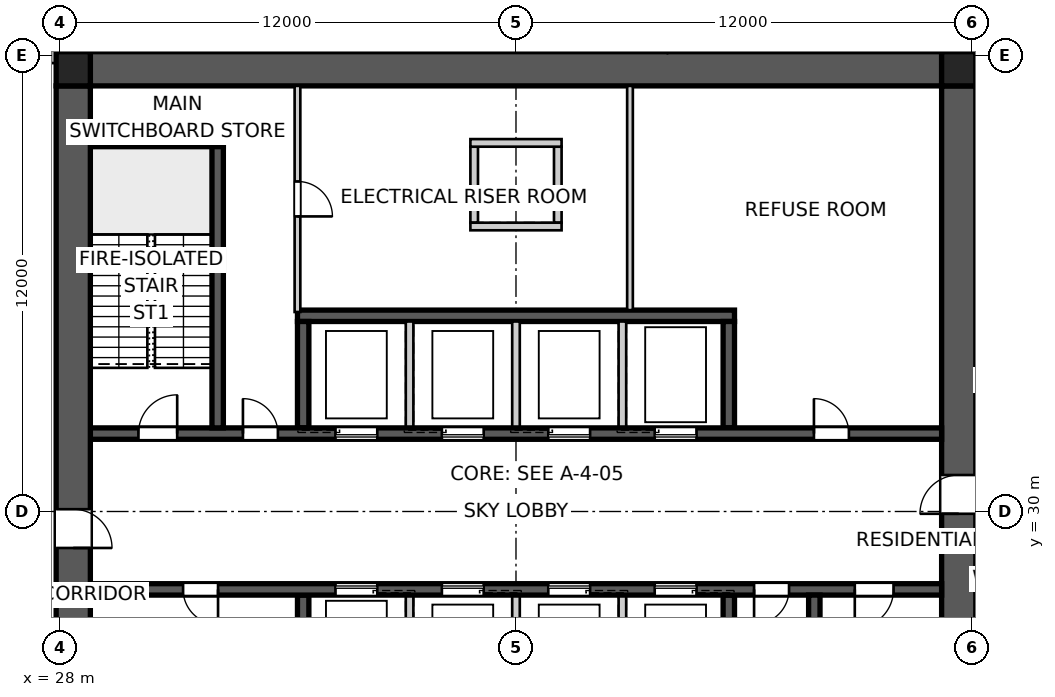
"""IFC4 building model, lengths in metres.
Left out: names, types, materials, properties, quantities, classifications, styles, units other than length and angle.
Written with IfcOpenShell. Run it as: python <this file> out.ifc"""

import sys

from ifc_helpers import new_model, si_unit, direction, frame, frame_2d, origin, origin_2d, place, context, subcontext, project, spatial, polyline, rectangle, outline, extrude, element, fill, save


model = new_model("IFC4")
c1 = context("Model", 3, precision=1e-05, world=origin(), true_north=direction((0.0, 1.0)))
c2 = subcontext(c1, "Body", "Model", "MODEL_VIEW")
j1 = project(units=[si_unit("LENGTHUNIT", "METRE"), si_unit("PLANEANGLEUNIT", "RADIAN")], contexts=[c1])
p1 = place(None, origin())
s1 = spatial("IfcSite", under=j1, at=p1, CompositionType="ELEMENT")
p2 = place(p1, origin())
s2 = spatial("IfcBuilding", under=s1, at=p2, CompositionType="ELEMENT")
p3 = place(p2, frame((0.0, 0.0, 138.8)))
s3 = spatial("IfcBuildingStorey", under=s2, at=p3, CompositionType="ELEMENT", Elevation=138.8)
p4 = place(p3, frame((28.8, 41.65, 0.0), z_axis=(0.0, 0.0, 1.0), x_axis=(1.0, 0.0, 0.0)))
e1 = element("IfcWall", 1, at=p4, inside=s3, PredefinedType="SHEAR", context=c2, shape_type="SweptSolid", body=[
    extrude(outline(polyline([(0.0, -0.45), (22.4, -0.45), (22.4, -0.025), (22.85, -0.025), (22.85, 0.025), (22.4, 0.025), (22.4, 0.45), (0.0, 0.45), (0.0, 0.025), (-0.45, 0.025), (-0.45, -0.025), (0.0, -0.025), (0.0, -0.45)])), origin(), (0.0, 0.0, 1.0), 5.0),
])
p5 = place(p3, frame((51.65, 18.8, 0.0), z_axis=(0.0, 0.0, 1.0), x_axis=(0.0, 1.0, 0.0)))
e2 = element("IfcWall", 2, at=p5, inside=s3, PredefinedType="SHEAR", context=c2, shape_type="SweptSolid", body=[
    extrude(outline(polyline([(0.0, -0.45), (22.4, -0.45), (22.4, -0.025), (22.85, -0.025), (22.85, 0.025), (22.4, 0.025), (22.4, 0.45), (0.0, 0.45), (0.0, 0.025), (-0.45, 0.025), (-0.45, -0.025), (0.0, -0.025), (0.0, -0.45)])), origin(), (0.0, 0.0, 1.0), 5.0),
])
p6 = place(p5, frame((11.14, 0.0, 0.0)))
e3 = element("IfcOpeningElement", 3, at=p6, cuts=e2, PredefinedType="OPENING", context=c2, shape_type="SweptSolid", body=[
    extrude(rectangle(XDim=1.02, YDim=2.4, at=frame_2d((0.51, 1.2))), frame((0.0, 0.46, 0.0), z_axis=(0.0, -1.0, 0.0), x_axis=(1.0, 0.0, 0.0)), (0.0, 0.0, 1.0), 0.92),
])
p7 = place(p3, frame((28.35, 41.2, 0.0), z_axis=(0.0, 0.0, 1.0), x_axis=(0.0, -1.0, 0.0)))
e4 = element("IfcWall", 4, at=p7, inside=s3, PredefinedType="SHEAR", context=c2, shape_type="SweptSolid", body=[
    extrude(outline(polyline([(0.0, -0.45), (22.4, -0.45), (22.4, -0.025), (22.85, -0.025), (22.85, 0.025), (22.4, 0.025), (22.4, 0.45), (0.0, 0.45), (0.0, 0.025), (-0.45, 0.025), (-0.45, -0.025), (0.0, -0.025), (0.0, -0.45)])), origin(), (0.0, 0.0, 1.0), 5.0),
])
p8 = place(p7, frame((11.14, 0.0, 0.0)))
e5 = element("IfcOpeningElement", 5, at=p8, cuts=e4, PredefinedType="OPENING", context=c2, shape_type="SweptSolid", body=[
    extrude(rectangle(XDim=1.02, YDim=2.4, at=frame_2d((0.51, 1.2))), frame((0.0, 0.46, 0.0), z_axis=(0.0, -1.0, 0.0), x_axis=(1.0, 0.0, 0.0)), (0.0, 0.0, 1.0), 0.92),
])
p9 = place(p3, frame((28.8, 32.05, 0.0), z_axis=(0.0, 0.0, 1.0), x_axis=(1.0, 0.0, 0.0)))
e6 = element("IfcWall", 6, at=p9, inside=s3, PredefinedType="SHEAR", context=c2, shape_type="SweptSolid", body=[
    extrude(rectangle(XDim=22.4, YDim=0.3, at=frame_2d((11.2, 0.0))), origin(), (0.0, 0.0, 1.0), 5.0),
])
p10 = place(p9, frame((19.04, 0.0, 0.0)))
e7 = element("IfcOpeningElement", 7, at=p10, cuts=e6, PredefinedType="OPENING", context=c2, shape_type="SweptSolid", body=[
    extrude(rectangle(XDim=0.92, YDim=2.1, at=frame_2d((0.46, 1.05))), frame((0.0, 0.16, 0.0), z_axis=(0.0, -1.0, 0.0), x_axis=(1.0, 0.0, 0.0)), (0.0, 0.0, 1.0), 0.32),
])
p11 = place(p9, frame((1.265, 0.0, 0.0)))
e8 = element("IfcOpeningElement", 8, at=p11, cuts=e6, PredefinedType="OPENING", context=c2, shape_type="SweptSolid", body=[
    extrude(rectangle(XDim=1.02, YDim=2.1, at=frame_2d((0.51, 1.05))), frame((0.0, 0.16, 0.0), z_axis=(0.0, -1.0, 0.0), x_axis=(1.0, 0.0, 0.0)), (0.0, 0.0, 1.0), 0.32),
])
p12 = place(p9, frame((4.015, 0.0, 0.0)))
e9 = element("IfcOpeningElement", 9, at=p12, cuts=e6, PredefinedType="OPENING", context=c2, shape_type="SweptSolid", body=[
    extrude(rectangle(XDim=0.92, YDim=2.1, at=frame_2d((0.46, 1.05))), frame((0.0, 0.16, 0.0), z_axis=(0.0, -1.0, 0.0), x_axis=(1.0, 0.0, 0.0)), (0.0, 0.0, 1.0), 0.32),
])
p13 = place(p9, frame((6.45, 0.0, 0.0)))
e10 = element("IfcOpeningElement", 10, at=p13, cuts=e6, PredefinedType="OPENING", context=c2, shape_type="SweptSolid", body=[
    extrude(rectangle(XDim=1.1, YDim=2.1, at=frame_2d((0.55, 1.05))), frame((0.0, 0.16, 0.0), z_axis=(0.0, -1.0, 0.0), x_axis=(1.0, 0.0, 0.0)), (0.0, 0.0, 1.0), 0.32),
])
p14 = place(p9, frame((9.25, 0.0, 0.0)))
e11 = element("IfcOpeningElement", 11, at=p14, cuts=e6, PredefinedType="OPENING", context=c2, shape_type="SweptSolid", body=[
    extrude(rectangle(XDim=1.1, YDim=2.1, at=frame_2d((0.55, 1.05))), frame((0.0, 0.16, 0.0), z_axis=(0.0, -1.0, 0.0), x_axis=(1.0, 0.0, 0.0)), (0.0, 0.0, 1.0), 0.32),
])
p15 = place(p9, frame((12.05, 0.0, 0.0)))
e12 = element("IfcOpeningElement", 12, at=p15, cuts=e6, PredefinedType="OPENING", context=c2, shape_type="SweptSolid", body=[
    extrude(rectangle(XDim=1.1, YDim=2.1, at=frame_2d((0.55, 1.05))), frame((0.0, 0.16, 0.0), z_axis=(0.0, -1.0, 0.0), x_axis=(1.0, 0.0, 0.0)), (0.0, 0.0, 1.0), 0.32),
])
p16 = place(p9, frame((14.85, 0.0, 0.0)))
e13 = element("IfcOpeningElement", 13, at=p16, cuts=e6, PredefinedType="OPENING", context=c2, shape_type="SweptSolid", body=[
    extrude(rectangle(XDim=1.1, YDim=2.1, at=frame_2d((0.55, 1.05))), frame((0.0, 0.16, 0.0), z_axis=(0.0, -1.0, 0.0), x_axis=(1.0, 0.0, 0.0)), (0.0, 0.0, 1.0), 0.32),
])
p17 = place(p3, frame((51.2, 27.95, 0.0), z_axis=(0.0, 0.0, 1.0), x_axis=(-1.0, 0.0, 0.0)))
e14 = element("IfcWall", 14, at=p17, inside=s3, PredefinedType="SHEAR", context=c2, shape_type="SweptSolid", body=[
    extrude(rectangle(XDim=22.4, YDim=0.3, at=frame_2d((11.2, 0.0))), origin(), (0.0, 0.0, 1.0), 5.0),
])
p18 = place(p17, frame((19.04, 0.0, 0.0)))
e15 = element("IfcOpeningElement", 15, at=p18, cuts=e14, PredefinedType="OPENING", context=c2, shape_type="SweptSolid", body=[
    extrude(rectangle(XDim=0.92, YDim=2.1, at=frame_2d((0.46, 1.05))), frame((0.0, 0.16, 0.0), z_axis=(0.0, -1.0, 0.0), x_axis=(1.0, 0.0, 0.0)), (0.0, 0.0, 1.0), 0.32),
])
p19 = place(p17, frame((1.265, 0.0, 0.0)))
e16 = element("IfcOpeningElement", 16, at=p19, cuts=e14, PredefinedType="OPENING", context=c2, shape_type="SweptSolid", body=[
    extrude(rectangle(XDim=1.02, YDim=2.1, at=frame_2d((0.51, 1.05))), frame((0.0, 0.16, 0.0), z_axis=(0.0, -1.0, 0.0), x_axis=(1.0, 0.0, 0.0)), (0.0, 0.0, 1.0), 0.32),
])
p20 = place(p17, frame((4.015, 0.0, 0.0)))
e17 = element("IfcOpeningElement", 17, at=p20, cuts=e14, PredefinedType="OPENING", context=c2, shape_type="SweptSolid", body=[
    extrude(rectangle(XDim=0.92, YDim=2.1, at=frame_2d((0.46, 1.05))), frame((0.0, 0.16, 0.0), z_axis=(0.0, -1.0, 0.0), x_axis=(1.0, 0.0, 0.0)), (0.0, 0.0, 1.0), 0.32),
])
p21 = place(p17, frame((6.45, 0.0, 0.0)))
e18 = element("IfcOpeningElement", 18, at=p21, cuts=e14, PredefinedType="OPENING", context=c2, shape_type="SweptSolid", body=[
    extrude(rectangle(XDim=1.1, YDim=2.1, at=frame_2d((0.55, 1.05))), frame((0.0, 0.16, 0.0), z_axis=(0.0, -1.0, 0.0), x_axis=(1.0, 0.0, 0.0)), (0.0, 0.0, 1.0), 0.32),
])
p22 = place(p17, frame((9.25, 0.0, 0.0)))
e19 = element("IfcOpeningElement", 19, at=p22, cuts=e14, PredefinedType="OPENING", context=c2, shape_type="SweptSolid", body=[
    extrude(rectangle(XDim=1.1, YDim=2.1, at=frame_2d((0.55, 1.05))), frame((0.0, 0.16, 0.0), z_axis=(0.0, -1.0, 0.0), x_axis=(1.0, 0.0, 0.0)), (0.0, 0.0, 1.0), 0.32),
])
p23 = place(p17, frame((12.05, 0.0, 0.0)))
e20 = element("IfcOpeningElement", 20, at=p23, cuts=e14, PredefinedType="OPENING", context=c2, shape_type="SweptSolid", body=[
    extrude(rectangle(XDim=1.1, YDim=2.1, at=frame_2d((0.55, 1.05))), frame((0.0, 0.16, 0.0), z_axis=(0.0, -1.0, 0.0), x_axis=(1.0, 0.0, 0.0)), (0.0, 0.0, 1.0), 0.32),
])
p24 = place(p17, frame((14.85, 0.0, 0.0)))
e21 = element("IfcOpeningElement", 21, at=p24, cuts=e14, PredefinedType="OPENING", context=c2, shape_type="SweptSolid", body=[
    extrude(rectangle(XDim=1.1, YDim=2.1, at=frame_2d((0.55, 1.05))), frame((0.0, 0.16, 0.0), z_axis=(0.0, -1.0, 0.0), x_axis=(1.0, 0.0, 0.0)), (0.0, 0.0, 1.0), 0.32),
])
p25 = place(p3, frame((34.25, 35.15, 0.0), z_axis=(0.0, 0.0, 1.0), x_axis=(1.0, 0.0, 0.0)))
e22 = element("IfcWall", 22, at=p25, inside=s3, PredefinedType="SHEAR", context=c2, shape_type="SweptSolid", body=[
    extrude(rectangle(XDim=11.5, YDim=0.3, at=frame_2d((5.75, 0.0))), origin(), (0.0, 0.0, 1.0), 5.0),
])
for number, where, z_axis, x_axis in (
    (23, (34.4, 32.2, 0.0), (0.0, 0.0, 1.0), (0.0, 1.0, 0.0)),
    (24, (45.6, 27.8, 0.0), (0.0, 0.0, 1.0), (0.0, -1.0, 0.0)),
):
    element("IfcWall", number, at=place(p3, frame(where, z_axis=z_axis, x_axis=x_axis)), inside=s3, PredefinedType="SHEAR", context=c2, shape_type="SweptSolid", body=[
        extrude(rectangle(XDim=2.8, YDim=0.3, at=frame_2d((1.4, 0.0))), origin(), (0.0, 0.0, 1.0), 5.0),
    ])
for number, where, z_axis, x_axis in (
    (25, (37.2, 32.2, 0.0), (0.0, 0.0, 1.0), (0.0, 1.0, 0.0)),
    (26, (42.8, 27.8, 0.0), (0.0, 0.0, 1.0), (0.0, -1.0, 0.0)),
    (27, (40.0, 32.2, 0.0), (0.0, 0.0, 1.0), (0.0, 1.0, 0.0)),
    (28, (40.0, 27.8, 0.0), (0.0, 0.0, 1.0), (0.0, -1.0, 0.0)),
    (29, (42.8, 32.2, 0.0), (0.0, 0.0, 1.0), (0.0, 1.0, 0.0)),
    (30, (37.2, 27.8, 0.0), (0.0, 0.0, 1.0), (0.0, -1.0, 0.0)),
):
    element("IfcWall", number, at=place(p3, frame(where, z_axis=z_axis, x_axis=x_axis)), inside=s3, PredefinedType="SOLIDWALL", context=c2, shape_type="SweptSolid", body=[
        extrude(rectangle(XDim=2.8, YDim=0.2, at=frame_2d((1.4, 0.0))), origin(), (0.0, 0.0, 1.0), 5.0),
    ])
for number, where, z_axis, x_axis in (
    (31, (45.6, 32.2, 0.0), (0.0, 0.0, 1.0), (0.0, 1.0, 0.0)),
    (32, (34.4, 27.8, 0.0), (0.0, 0.0, 1.0), (0.0, -1.0, 0.0)),
):
    element("IfcWall", number, at=place(p3, frame(where, z_axis=z_axis, x_axis=x_axis)), inside=s3, PredefinedType="SHEAR", context=c2, shape_type="SweptSolid", body=[
        extrude(rectangle(XDim=2.8, YDim=0.3, at=frame_2d((1.4, 0.0))), origin(), (0.0, 0.0, 1.0), 5.0),
    ])
p26 = place(p3, frame((32.15, 32.2, 0.0), z_axis=(0.0, 0.0, 1.0), x_axis=(0.0, 1.0, 0.0)))
e33 = element("IfcWall", 33, at=p26, inside=s3, PredefinedType="SHEAR", context=c2, shape_type="SweptSolid", body=[
    extrude(rectangle(XDim=7.7, YDim=0.3, at=frame_2d((3.85, 0.0))), origin(), (0.0, 0.0, 1.0), 5.0),
])
p27 = place(p3, frame((28.8, 39.75, 0.0), z_axis=(0.0, 0.0, 1.0), x_axis=(1.0, 0.0, 0.0)))
e34 = element("IfcWall", 34, at=p27, inside=s3, PredefinedType="SHEAR", context=c2, shape_type="SweptSolid", body=[
    extrude(rectangle(XDim=3.5, YDim=0.3, at=frame_2d((1.75, 0.0))), origin(), (0.0, 0.0, 1.0), 5.0),
])
p28 = place(p3, frame((47.85, 27.8, 0.0), z_axis=(0.0, 0.0, 1.0), x_axis=(0.0, -1.0, 0.0)))
e35 = element("IfcWall", 35, at=p28, inside=s3, PredefinedType="SHEAR", context=c2, shape_type="SweptSolid", body=[
    extrude(rectangle(XDim=7.7, YDim=0.3, at=frame_2d((3.85, 0.0))), origin(), (0.0, 0.0, 1.0), 5.0),
])
for number, where, z_axis, x_axis in (
    (36, (38.9, 37.6, 0.0), (0.0, 0.0, 1.0), (0.0, 1.0, 0.0)),
    (37, (41.1, 37.6, 0.0), (0.0, 0.0, 1.0), (0.0, 1.0, 0.0)),
):
    element("IfcWall", number, at=place(p3, frame(where, z_axis=z_axis, x_axis=x_axis)), inside=s3, PredefinedType="SOLIDWALL", context=c2, shape_type="SweptSolid", body=[
        extrude(rectangle(XDim=2.0, YDim=0.2, at=frame_2d((1.0, 0.0))), origin(), (0.0, 0.0, 1.0), 5.0),
    ])
for number, where, z_axis, x_axis in (
    (38, (38.8, 37.5, 0.0), (0.0, 0.0, 1.0), (1.0, 0.0, 0.0)),
    (39, (38.8, 39.7, 0.0), (0.0, 0.0, 1.0), (1.0, 0.0, 0.0)),
):
    element("IfcWall", number, at=place(p3, frame(where, z_axis=z_axis, x_axis=x_axis)), inside=s3, PredefinedType="SOLIDWALL", context=c2, shape_type="SweptSolid", body=[
        extrude(rectangle(XDim=2.4, YDim=0.2, at=frame_2d((1.2, 0.0))), origin(), (0.0, 0.0, 1.0), 5.0),
    ])
for number, where, z_axis, x_axis in (
    (40, (51.65, 41.65, 0.0), (0.0, 0.0, 1.0), (1.0, 0.0, 0.0)),
    (41, (28.35, 41.65, 0.0), (0.0, 0.0, 1.0), (1.0, 0.0, 0.0)),
):
    element("IfcColumn", number, at=place(p3, frame(where, z_axis=z_axis, x_axis=x_axis)), inside=s3, PredefinedType="COLUMN", context=c2, shape_type="SweptSolid", body=[
        extrude(rectangle(XDim=0.9, YDim=0.9, at=origin_2d()), origin(), (0.0, 0.0, 1.0), 5.0),
    ])
p29 = place(p3, frame((52.14, 41.8, 0.0), z_axis=(0.0, 0.0, 1.0), x_axis=(0.0, 1.0, 0.0)))
e42 = element("IfcWall", 42, at=p29, inside=s3, PredefinedType="PARTITIONING", context=c2, shape_type="SweptSolid", body=[
    extrude(rectangle(XDim=1.9, YDim=0.2, at=frame_2d((0.95, 0.0))), origin(), (0.0, 0.0, 1.0), 4.85),
])
p30 = place(p29, frame((0.51, 0.0, 0.0)))
e43 = element("IfcOpeningElement", 43, at=p30, cuts=e42, PredefinedType="OPENING", context=c2, shape_type="SweptSolid", body=[
    extrude(rectangle(XDim=1.02, YDim=2.34, at=frame_2d((0.51, 1.17))), frame((0.0, 0.11, 0.0), z_axis=(0.0, -1.0, 0.0), x_axis=(1.0, 0.0, 0.0)), (0.0, 0.0, 1.0), 0.22),
])
p31 = place(p3, frame((27.86, 41.8, 0.0), z_axis=(0.0, 0.0, 1.0), x_axis=(0.0, 1.0, 0.0)))
e44 = element("IfcWall", 44, at=p31, inside=s3, PredefinedType="PARTITIONING", context=c2, shape_type="SweptSolid", body=[
    extrude(rectangle(XDim=1.9, YDim=0.2, at=frame_2d((0.95, 0.0))), origin(), (0.0, 0.0, 1.0), 4.85),
])
p32 = place(p31, frame((0.51, 0.0, 0.0)))
e45 = element("IfcOpeningElement", 45, at=p32, cuts=e44, PredefinedType="OPENING", context=c2, shape_type="SweptSolid", body=[
    extrude(rectangle(XDim=1.02, YDim=2.34, at=frame_2d((0.51, 1.17))), frame((0.0, 0.11, 0.0), z_axis=(0.0, -1.0, 0.0), x_axis=(1.0, 0.0, 0.0)), (0.0, 0.0, 1.0), 0.22),
])
p33 = place(p3, frame((40.677, 51.53, 0.0), z_axis=(0.0, 0.0, 1.0), x_axis=(0.342004948299, -0.939698151184, 0.0)))
e46 = element("IfcWall", 46, at=p33, inside=s3, PredefinedType="PARTITIONING", context=c2, shape_type="SweptSolid", body=[
    extrude(rectangle(XDim=10.03, YDim=0.25, at=frame_2d((5.015, 0.0))), origin(), (0.0, 0.0, 1.0), 4.85),
])
p34 = place(p3, frame((34.25, 41.2, 0.0), z_axis=(0.0, 0.0, 1.0), x_axis=(0.0, -1.0, 0.0)))
e47 = element("IfcWall", 47, at=p34, inside=s3, PredefinedType="SOLIDWALL", context=c2, shape_type="SweptSolid", body=[
    extrude(rectangle(XDim=5.95, YDim=0.15, at=frame_2d((2.975, 0.0))), origin(), (0.0, 0.0, 1.0), 4.85),
])
p35 = place(p34, frame((2.515, 0.0, 0.0)))
e48 = element("IfcOpeningElement", 48, at=p35, cuts=e47, PredefinedType="OPENING", context=c2, shape_type="SweptSolid", body=[
    extrude(rectangle(XDim=0.92, YDim=2.1, at=frame_2d((0.46, 1.05))), frame((0.0, 0.085, 0.0), z_axis=(0.0, -1.0, 0.0), x_axis=(1.0, 0.0, 0.0)), (0.0, 0.0, 1.0), 0.17),
])
p36 = place(p3, frame((43.0, 41.2, 0.0), z_axis=(0.0, 0.0, 1.0), x_axis=(0.0, -1.0, 0.0)))
e49 = element("IfcWall", 49, at=p36, inside=s3, PredefinedType="SOLIDWALL", context=c2, shape_type="SweptSolid", body=[
    extrude(rectangle(XDim=5.9, YDim=0.15, at=frame_2d((2.95, 0.0))), origin(), (0.0, 0.0, 1.0), 4.85),
])
p37 = place(p10, origin())
e50 = element("IfcDoor", 50, at=p37, inside=s3, OperationType="SINGLE_SWING_LEFT", PredefinedType="DOOR", context=c2, shape_type="SweptSolid", body=[
    extrude(rectangle(XDim=0.92, YDim=2.1, at=frame_2d((0.46, 1.05))), frame((0.0, 0.025, 0.0), z_axis=(0.0, -1.0, 0.0), x_axis=(1.0, 0.0, 0.0)), (0.0, 0.0, 1.0), 0.05),
])
fill(e7, e50)
p38 = place(p18, origin())
e51 = element("IfcDoor", 51, at=p38, inside=s3, OperationType="SINGLE_SWING_LEFT", PredefinedType="DOOR", context=c2, shape_type="SweptSolid", body=[
    extrude(rectangle(XDim=0.92, YDim=2.1, at=frame_2d((0.46, 1.05))), frame((0.0, 0.025, 0.0), z_axis=(0.0, -1.0, 0.0), x_axis=(1.0, 0.0, 0.0)), (0.0, 0.0, 1.0), 0.05),
])
fill(e15, e51)
p39 = place(p19, origin())
e52 = element("IfcDoor", 52, at=p39, inside=s3, OperationType="SINGLE_SWING_RIGHT", PredefinedType="DOOR", context=c2, shape_type="SweptSolid", body=[
    extrude(rectangle(XDim=1.02, YDim=2.1, at=frame_2d((0.51, 1.05))), frame((0.0, 0.025, 0.0), z_axis=(0.0, -1.0, 0.0), x_axis=(1.0, 0.0, 0.0)), (0.0, 0.0, 1.0), 0.05),
])
fill(e16, e52)
p40 = place(p11, origin())
e53 = element("IfcDoor", 53, at=p40, inside=s3, OperationType="SINGLE_SWING_RIGHT", PredefinedType="DOOR", context=c2, shape_type="SweptSolid", body=[
    extrude(rectangle(XDim=1.02, YDim=2.1, at=frame_2d((0.51, 1.05))), frame((0.0, 0.025, 0.0), z_axis=(0.0, -1.0, 0.0), x_axis=(1.0, 0.0, 0.0)), (0.0, 0.0, 1.0), 0.05),
])
fill(e8, e53)
p41 = place(p12, origin())
e54 = element("IfcDoor", 54, at=p41, inside=s3, OperationType="SINGLE_SWING_LEFT", PredefinedType="DOOR", context=c2, shape_type="SweptSolid", body=[
    extrude(rectangle(XDim=0.92, YDim=2.1, at=frame_2d((0.46, 1.05))), frame((0.0, 0.025, 0.0), z_axis=(0.0, -1.0, 0.0), x_axis=(1.0, 0.0, 0.0)), (0.0, 0.0, 1.0), 0.05),
])
fill(e9, e54)
p42 = place(p20, origin())
e55 = element("IfcDoor", 55, at=p42, inside=s3, OperationType="SINGLE_SWING_RIGHT", PredefinedType="DOOR", context=c2, shape_type="SweptSolid", body=[
    extrude(rectangle(XDim=0.92, YDim=2.1, at=frame_2d((0.46, 1.05))), frame((0.0, 0.025, 0.0), z_axis=(0.0, -1.0, 0.0), x_axis=(1.0, 0.0, 0.0)), (0.0, 0.0, 1.0), 0.05),
])
fill(e17, e55)
p43 = place(p35, origin())
e56 = element("IfcDoor", 56, at=p43, inside=s3, OperationType="SINGLE_SWING_RIGHT", PredefinedType="DOOR", context=c2, shape_type="SweptSolid", body=[
    extrude(rectangle(XDim=0.92, YDim=2.1, at=frame_2d((0.46, 1.05))), frame((0.0, 0.025, 0.0), z_axis=(0.0, -1.0, 0.0), x_axis=(1.0, 0.0, 0.0)), (0.0, 0.0, 1.0), 0.05),
])
fill(e48, e56)
p44 = place(p6, origin())
e57 = element("IfcDoor", 57, at=p44, inside=s3, OperationType="SINGLE_SWING_LEFT", PredefinedType="DOOR", context=c2, shape_type="SweptSolid", body=[
    extrude(rectangle(XDim=1.02, YDim=2.4, at=frame_2d((0.51, 1.2))), frame((0.0, 0.025, 0.0), z_axis=(0.0, -1.0, 0.0), x_axis=(1.0, 0.0, 0.0)), (0.0, 0.0, 1.0), 0.05),
])
fill(e3, e57)
p45 = place(p8, origin())
e58 = element("IfcDoor", 58, at=p45, inside=s3, OperationType="SINGLE_SWING_RIGHT", PredefinedType="DOOR", context=c2, shape_type="SweptSolid", body=[
    extrude(rectangle(XDim=1.02, YDim=2.4, at=frame_2d((0.51, 1.2))), frame((0.0, 0.025, 0.0), z_axis=(0.0, -1.0, 0.0), x_axis=(1.0, 0.0, 0.0)), (0.0, 0.0, 1.0), 0.05),
])
fill(e5, e58)
p46 = place(p13, origin())
e59 = element("IfcDoor", 59, at=p46, inside=s3, OperationType="SLIDING_TO_LEFT", PredefinedType="DOOR", context=c2, shape_type="SweptSolid", body=[
    extrude(rectangle(XDim=1.1, YDim=2.1, at=frame_2d((0.55, 1.05))), frame((0.0, 0.025, 0.0), z_axis=(0.0, -1.0, 0.0), x_axis=(1.0, 0.0, 0.0)), (0.0, 0.0, 1.0), 0.05),
])
fill(e10, e59)
p47 = place(p21, origin())
e60 = element("IfcDoor", 60, at=p47, inside=s3, OperationType="SLIDING_TO_LEFT", PredefinedType="DOOR", context=c2, shape_type="SweptSolid", body=[
    extrude(rectangle(XDim=1.1, YDim=2.1, at=frame_2d((0.55, 1.05))), frame((0.0, 0.025, 0.0), z_axis=(0.0, -1.0, 0.0), x_axis=(1.0, 0.0, 0.0)), (0.0, 0.0, 1.0), 0.05),
])
fill(e18, e60)
p48 = place(p14, origin())
e61 = element("IfcDoor", 61, at=p48, inside=s3, OperationType="SLIDING_TO_LEFT", PredefinedType="DOOR", context=c2, shape_type="SweptSolid", body=[
    extrude(rectangle(XDim=1.1, YDim=2.1, at=frame_2d((0.55, 1.05))), frame((0.0, 0.025, 0.0), z_axis=(0.0, -1.0, 0.0), x_axis=(1.0, 0.0, 0.0)), (0.0, 0.0, 1.0), 0.05),
])
fill(e11, e61)
p49 = place(p22, origin())
e62 = element("IfcDoor", 62, at=p49, inside=s3, OperationType="SLIDING_TO_LEFT", PredefinedType="DOOR", context=c2, shape_type="SweptSolid", body=[
    extrude(rectangle(XDim=1.1, YDim=2.1, at=frame_2d((0.55, 1.05))), frame((0.0, 0.025, 0.0), z_axis=(0.0, -1.0, 0.0), x_axis=(1.0, 0.0, 0.0)), (0.0, 0.0, 1.0), 0.05),
])
fill(e19, e62)
p50 = place(p15, origin())
e63 = element("IfcDoor", 63, at=p50, inside=s3, OperationType="SLIDING_TO_LEFT", PredefinedType="DOOR", context=c2, shape_type="SweptSolid", body=[
    extrude(rectangle(XDim=1.1, YDim=2.1, at=frame_2d((0.55, 1.05))), frame((0.0, 0.025, 0.0), z_axis=(0.0, -1.0, 0.0), x_axis=(1.0, 0.0, 0.0)), (0.0, 0.0, 1.0), 0.05),
])
fill(e12, e63)
p51 = place(p23, origin())
e64 = element("IfcDoor", 64, at=p51, inside=s3, OperationType="SLIDING_TO_LEFT", PredefinedType="DOOR", context=c2, shape_type="SweptSolid", body=[
    extrude(rectangle(XDim=1.1, YDim=2.1, at=frame_2d((0.55, 1.05))), frame((0.0, 0.025, 0.0), z_axis=(0.0, -1.0, 0.0), x_axis=(1.0, 0.0, 0.0)), (0.0, 0.0, 1.0), 0.05),
])
fill(e20, e64)
p52 = place(p16, origin())
e65 = element("IfcDoor", 65, at=p52, inside=s3, OperationType="SLIDING_TO_LEFT", PredefinedType="DOOR", context=c2, shape_type="SweptSolid", body=[
    extrude(rectangle(XDim=1.1, YDim=2.1, at=frame_2d((0.55, 1.05))), frame((0.0, 0.025, 0.0), z_axis=(0.0, -1.0, 0.0), x_axis=(1.0, 0.0, 0.0)), (0.0, 0.0, 1.0), 0.05),
])
fill(e13, e65)
p53 = place(p24, origin())
e66 = element("IfcDoor", 66, at=p53, inside=s3, OperationType="SLIDING_TO_LEFT", PredefinedType="DOOR", context=c2, shape_type="SweptSolid", body=[
    extrude(rectangle(XDim=1.1, YDim=2.1, at=frame_2d((0.55, 1.05))), frame((0.0, 0.025, 0.0), z_axis=(0.0, -1.0, 0.0), x_axis=(1.0, 0.0, 0.0)), (0.0, 0.0, 1.0), 0.05),
])
fill(e21, e66)
save(model, sys.argv[1])
